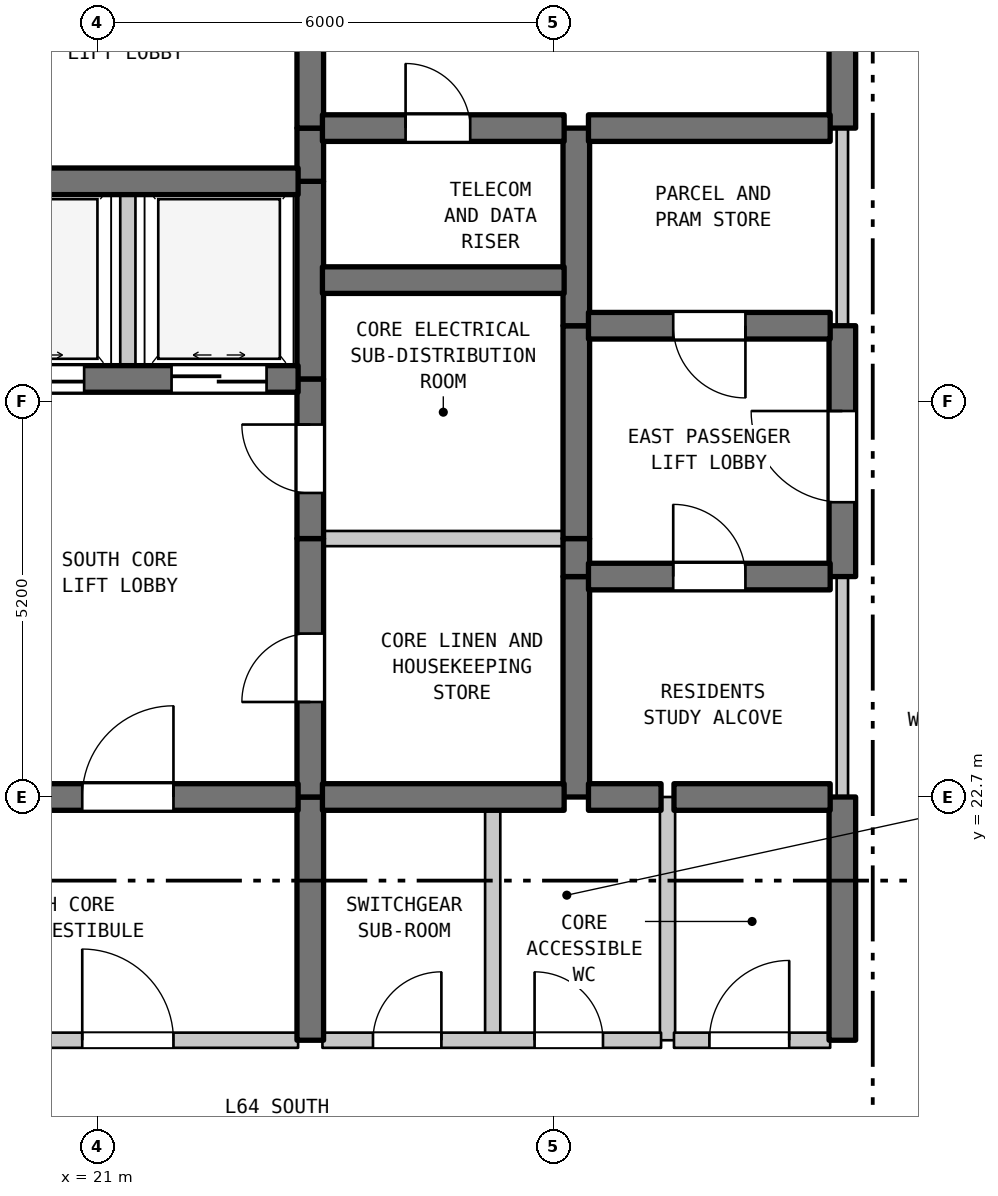
"""IFC4 building model, lengths in metres.
Left out: names, types, materials, properties, quantities, classifications, styles, units other than length and angle.
Written with IfcOpenShell. Run it as: python <this file> out.ifc"""

import sys

from ifc_helpers import new_model, si_unit, direction, frame, frame_2d, origin, place, context, subcontext, project, spatial, rectangle, extrude, element, fill, save


model = new_model("IFC4")
c1 = context("Model", 3, precision=1e-05, world=origin(), true_north=direction((0.0, 1.0)))
c2 = subcontext(c1, "Body", "Model", "MODEL_VIEW")
j1 = project(units=[si_unit("LENGTHUNIT", "METRE"), si_unit("PLANEANGLEUNIT", "RADIAN")], contexts=[c1])
p1 = place(None, origin())
s1 = spatial("IfcSite", under=j1, at=p1, CompositionType="ELEMENT")
p2 = place(p1, origin())
s2 = spatial("IfcBuilding", under=s1, at=p2, CompositionType="ELEMENT")
p3 = place(p2, frame((0.0, 0.0, 258.4)))
s3 = spatial("IfcBuildingStorey", under=s2, at=p3, CompositionType="ELEMENT", Elevation=258.4)
p4 = place(p3, frame((21.4, 28.2, 0.0), z_axis=(0.0, 0.0, 1.0), x_axis=(0.0, 1.0, 0.0)))
e1 = element("IfcWall", 1, at=p4, inside=s3, PredefinedType="STANDARD", context=c2, shape_type="SweptSolid", body=[
    extrude(rectangle(XDim=2.6, YDim=0.2, at=frame_2d((1.3, 0.0))), origin(), (0.0, 0.0, 1.0), 3.39),
])
p5 = place(p3, frame((23.8, 19.5, 0.0), z_axis=(0.0, 0.0, 1.0), x_axis=(0.0, 1.0, 0.0)))
e2 = element("IfcWall", 2, at=p5, inside=s3, PredefinedType="SHEAR", context=c2, shape_type="SweptSolid", body=[
    extrude(rectangle(XDim=3.2, YDim=0.35, at=frame_2d((1.6, 0.0))), origin(), (0.0, 0.0, 1.0), 3.39),
])
p6 = place(p3, frame((23.8, 22.7, 0.0), z_axis=(0.0, 0.0, 1.0), x_axis=(0.0, 1.0, 0.0)))
e3 = element("IfcWall", 3, at=p6, inside=s3, PredefinedType="SHEAR", context=c2, shape_type="SweptSolid", body=[
    extrude(rectangle(XDim=3.4, YDim=0.35, at=frame_2d((1.7, 0.0))), origin(), (0.0, 0.0, 1.0), 3.39),
])
p7 = place(p6, frame((1.25, 0.0, 0.0)))
e4 = element("IfcOpeningElement", 4, at=p7, cuts=e3, PredefinedType="OPENING", context=c2, shape_type="SweptSolid", body=[
    extrude(rectangle(XDim=0.9, YDim=2.15, at=frame_2d((0.45, 1.075))), frame((0.0, 0.185, 0.0), z_axis=(0.0, -1.0, 0.0), x_axis=(1.0, 0.0, 0.0)), (0.0, 0.0, 1.0), 0.37),
])
p8 = place(p3, frame((23.8, 26.1, 0.0), z_axis=(0.0, 0.0, 1.0), x_axis=(0.0, 1.0, 0.0)))
e5 = element("IfcWall", 5, at=p8, inside=s3, PredefinedType="SHEAR", context=c2, shape_type="SweptSolid", body=[
    extrude(rectangle(XDim=2.1, YDim=0.35, at=frame_2d((1.05, 0.0))), origin(), (0.0, 0.0, 1.0), 3.39),
])
p9 = place(p8, frame((0.6, 0.0, 0.0)))
e6 = element("IfcOpeningElement", 6, at=p9, cuts=e5, PredefinedType="OPENING", context=c2, shape_type="SweptSolid", body=[
    extrude(rectangle(XDim=0.9, YDim=2.15, at=frame_2d((0.45, 1.075))), frame((0.0, 0.185, 0.0), z_axis=(0.0, -1.0, 0.0), x_axis=(1.0, 0.0, 0.0)), (0.0, 0.0, 1.0), 0.37),
])
p10 = place(p3, frame((23.8, 28.2, 0.0), z_axis=(0.0, 0.0, 1.0), x_axis=(0.0, 1.0, 0.0)))
e7 = element("IfcWall", 7, at=p10, inside=s3, PredefinedType="SHEAR", context=c2, shape_type="SweptSolid", body=[
    extrude(rectangle(XDim=2.6, YDim=0.35, at=frame_2d((1.3, 0.0))), origin(), (0.0, 0.0, 1.0), 3.39),
])
p11 = place(p3, frame((23.8, 30.8, 0.0), z_axis=(0.0, 0.0, 1.0), x_axis=(0.0, 1.0, 0.0)))
e8 = element("IfcWall", 8, at=p11, inside=s3, PredefinedType="SHEAR", context=c2, shape_type="SweptSolid", body=[
    extrude(rectangle(XDim=0.7, YDim=0.35, at=frame_2d((0.35, 0.0))), origin(), (0.0, 0.0, 1.0), 3.39),
])
p12 = place(p3, frame((23.8, 31.5, 0.0), z_axis=(0.0, 0.0, 1.0), x_axis=(0.0, 1.0, 0.0)))
e9 = element("IfcWall", 9, at=p12, inside=s3, PredefinedType="SHEAR", context=c2, shape_type="SweptSolid", body=[
    extrude(rectangle(XDim=3.5, YDim=0.35, at=frame_2d((1.75, 0.0))), origin(), (0.0, 0.0, 1.0), 3.39),
])
p13 = place(p12, frame((1.127, 0.0, 0.0)))
e10 = element("IfcOpeningElement", 10, at=p13, cuts=e9, PredefinedType="OPENING", context=c2, shape_type="SweptSolid", body=[
    extrude(rectangle(XDim=1.1, YDim=2.15, at=frame_2d((0.55, 1.075))), frame((0.0, 0.185, 0.0), z_axis=(0.0, -1.0, 0.0), x_axis=(1.0, 0.0, 0.0)), (0.0, 0.0, 1.0), 0.37),
])
p14 = place(p3, frame((26.2, 19.5, 0.0), z_axis=(0.0, 0.0, 1.0), x_axis=(0.0, 1.0, 0.0)))
e11 = element("IfcWall", 11, at=p14, inside=s3, PredefinedType="STANDARD", context=c2, shape_type="SweptSolid", body=[
    extrude(rectangle(XDim=3.2, YDim=0.2, at=frame_2d((1.6, 0.0))), origin(), (0.0, 0.0, 1.0), 3.39),
])
p15 = place(p3, frame((27.3, 22.7, 0.0), z_axis=(0.0, 0.0, 1.0), x_axis=(0.0, 1.0, 0.0)))
e12 = element("IfcWall", 12, at=p15, inside=s3, PredefinedType="SHEAR", context=c2, shape_type="SweptSolid", body=[
    extrude(rectangle(XDim=2.9, YDim=0.35, at=frame_2d((1.45, 0.0))), origin(), (0.0, 0.0, 1.0), 3.39),
])
p16 = place(p3, frame((27.3, 25.6, 0.0), z_axis=(0.0, 0.0, 1.0), x_axis=(0.0, 1.0, 0.0)))
e13 = element("IfcWall", 13, at=p16, inside=s3, PredefinedType="SHEAR", context=c2, shape_type="SweptSolid", body=[
    extrude(rectangle(XDim=0.5, YDim=0.35, at=frame_2d((0.25, 0.0))), origin(), (0.0, 0.0, 1.0), 3.39),
])
p17 = place(p3, frame((27.3, 26.1, 0.0), z_axis=(0.0, 0.0, 1.0), x_axis=(0.0, 1.0, 0.0)))
e14 = element("IfcWall", 14, at=p17, inside=s3, PredefinedType="SHEAR", context=c2, shape_type="SweptSolid", body=[
    extrude(rectangle(XDim=2.8, YDim=0.35, at=frame_2d((1.4, 0.0))), origin(), (0.0, 0.0, 1.0), 3.39),
])
p18 = place(p3, frame((27.3, 28.9, 0.0), z_axis=(0.0, 0.0, 1.0), x_axis=(0.0, 1.0, 0.0)))
e15 = element("IfcWall", 15, at=p18, inside=s3, PredefinedType="SHEAR", context=c2, shape_type="SweptSolid", body=[
    extrude(rectangle(XDim=2.6, YDim=0.35, at=frame_2d((1.3, 0.0))), origin(), (0.0, 0.0, 1.0), 3.39),
])
p19 = place(p3, frame((28.5, 19.5, 0.0), z_axis=(0.0, 0.0, 1.0), x_axis=(0.0, 1.0, 0.0)))
e16 = element("IfcWall", 16, at=p19, inside=s3, PredefinedType="STANDARD", context=c2, shape_type="SweptSolid", body=[
    extrude(rectangle(XDim=3.2, YDim=0.2, at=frame_2d((1.6, 0.0))), origin(), (0.0, 0.0, 1.0), 3.39),
])
p20 = place(p3, frame((30.8, 19.5, 0.0), z_axis=(0.0, 0.0, 1.0), x_axis=(0.0, 1.0, 0.0)))
e17 = element("IfcWall", 17, at=p20, inside=s3, PredefinedType="SHEAR", context=c2, shape_type="SweptSolid", body=[
    extrude(rectangle(XDim=3.2, YDim=0.35, at=frame_2d((1.6, 0.0))), origin(), (0.0, 0.0, 1.0), 3.39),
])
p21 = place(p3, frame((30.8, 22.7, 0.0), z_axis=(0.0, 0.0, 1.0), x_axis=(0.0, 1.0, 0.0)))
e18 = element("IfcWall", 18, at=p21, inside=s3, PredefinedType="STANDARD", context=c2, shape_type="SweptSolid", body=[
    extrude(rectangle(XDim=2.9, YDim=0.15, at=frame_2d((1.45, 0.0))), origin(), (0.0, 0.0, 1.0), 3.39),
])
p22 = place(p3, frame((30.8, 25.6, 0.0), z_axis=(0.0, 0.0, 1.0), x_axis=(0.0, 1.0, 0.0)))
e19 = element("IfcWall", 19, at=p22, inside=s3, PredefinedType="SHEAR", context=c2, shape_type="SweptSolid", body=[
    extrude(rectangle(XDim=3.3, YDim=0.35, at=frame_2d((1.65, 0.0))), origin(), (0.0, 0.0, 1.0), 3.39),
])
p23 = place(p22, frame((0.978, 0.0, 0.0)))
e20 = element("IfcOpeningElement", 20, at=p23, cuts=e19, PredefinedType="OPENING", context=c2, shape_type="SweptSolid", body=[
    extrude(rectangle(XDim=1.2, YDim=2.2, at=frame_2d((0.6, 1.1))), frame((0.0, 0.185, 0.0), z_axis=(0.0, -1.0, 0.0), x_axis=(1.0, 0.0, 0.0)), (0.0, 0.0, 1.0), 0.37),
])
p24 = place(p3, frame((30.8, 28.9, 0.0), z_axis=(0.0, 0.0, 1.0), x_axis=(0.0, 1.0, 0.0)))
e21 = element("IfcWall", 21, at=p24, inside=s3, PredefinedType="STANDARD", context=c2, shape_type="SweptSolid", body=[
    extrude(rectangle(XDim=2.6, YDim=0.15, at=frame_2d((1.3, 0.0))), origin(), (0.0, 0.0, 1.0), 3.39),
])
p25 = place(p3, frame((30.8, 31.5, 0.0), z_axis=(0.0, 0.0, 1.0), x_axis=(0.0, 1.0, 0.0)))
e22 = element("IfcWall", 22, at=p25, inside=s3, PredefinedType="SHEAR", context=c2, shape_type="SweptSolid", body=[
    extrude(rectangle(XDim=3.5, YDim=0.35, at=frame_2d((1.75, 0.0))), origin(), (0.0, 0.0, 1.0), 3.39),
])
p26 = place(p25, frame((1.15, 0.0, 0.0)))
e23 = element("IfcOpeningElement", 23, at=p26, cuts=e22, PredefinedType="OPENING", context=c2, shape_type="SweptSolid", body=[
    extrude(rectangle(XDim=1.2, YDim=2.2, at=frame_2d((0.6, 1.1))), frame((0.0, 0.185, 0.0), z_axis=(0.0, -1.0, 0.0), x_axis=(1.0, 0.0, 0.0)), (0.0, 0.0, 1.0), 0.37),
])
p27 = place(p3, frame((19.16, 19.5, 0.0), z_axis=(0.0, 0.0, 1.0), x_axis=(1.0, 0.0, 0.0)))
e24 = element("IfcWall", 24, at=p27, inside=s3, PredefinedType="STANDARD", context=c2, shape_type="SweptSolid", body=[
    extrude(rectangle(XDim=4.48, YDim=0.2, at=frame_2d((2.24, 0.0))), origin(), (0.0, 0.0, 1.0), 3.39),
])
p28 = place(p27, frame((1.64, 0.0, 0.0)))
e25 = element("IfcOpeningElement", 25, at=p28, cuts=e24, PredefinedType="OPENING", context=c2, shape_type="SweptSolid", body=[
    extrude(rectangle(XDim=1.2, YDim=2.2, at=frame_2d((0.6, 1.1))), frame((0.0, 0.11, 0.0), z_axis=(0.0, -1.0, 0.0), x_axis=(1.0, 0.0, 0.0)), (0.0, 0.0, 1.0), 0.22),
])
p29 = place(p3, frame((23.96, 19.5, 0.0), z_axis=(0.0, 0.0, 1.0), x_axis=(1.0, 0.0, 0.0)))
e26 = element("IfcWall", 26, at=p29, inside=s3, PredefinedType="STANDARD", context=c2, shape_type="SweptSolid", body=[
    extrude(rectangle(XDim=4.455, YDim=0.2, at=frame_2d((2.228, 0.0))), origin(), (0.0, 0.0, 1.0), 3.39),
])
p30 = place(p29, frame((0.665, 0.0, 0.0)))
e27 = element("IfcOpeningElement", 27, at=p30, cuts=e26, PredefinedType="OPENING", context=c2, shape_type="SweptSolid", body=[
    extrude(rectangle(XDim=0.9, YDim=2.15, at=frame_2d((0.45, 1.075))), frame((0.0, 0.11, 0.0), z_axis=(0.0, -1.0, 0.0), x_axis=(1.0, 0.0, 0.0)), (0.0, 0.0, 1.0), 0.22),
])
p31 = place(p29, frame((2.791, 0.0, 0.0)))
e28 = element("IfcOpeningElement", 28, at=p31, cuts=e26, PredefinedType="OPENING", context=c2, shape_type="SweptSolid", body=[
    extrude(rectangle(XDim=0.9, YDim=2.15, at=frame_2d((0.45, 1.075))), frame((0.0, 0.11, 0.0), z_axis=(0.0, -1.0, 0.0), x_axis=(1.0, 0.0, 0.0)), (0.0, 0.0, 1.0), 0.22),
])
p32 = place(p3, frame((28.585, 19.5, 0.0), z_axis=(0.0, 0.0, 1.0), x_axis=(1.0, 0.0, 0.0)))
e29 = element("IfcWall", 29, at=p32, inside=s3, PredefinedType="STANDARD", context=c2, shape_type="SweptSolid", body=[
    extrude(rectangle(XDim=2.055, YDim=0.2, at=frame_2d((1.027, 0.0))), origin(), (0.0, 0.0, 1.0), 3.39),
])
p33 = place(p32, frame((0.466, 0.0, 0.0)))
e30 = element("IfcOpeningElement", 30, at=p33, cuts=e29, PredefinedType="OPENING", context=c2, shape_type="SweptSolid", body=[
    extrude(rectangle(XDim=1.05, YDim=2.15, at=frame_2d((0.525, 1.075))), frame((0.0, 0.11, 0.0), z_axis=(0.0, -1.0, 0.0), x_axis=(1.0, 0.0, 0.0)), (0.0, 0.0, 1.0), 0.22),
])
p34 = place(p3, frame((19.16, 22.7, 0.0), z_axis=(0.0, 0.0, 1.0), x_axis=(1.0, 0.0, 0.0)))
e31 = element("IfcWall", 31, at=p34, inside=s3, PredefinedType="SHEAR", context=c2, shape_type="SweptSolid", body=[
    extrude(rectangle(XDim=4.48, YDim=0.35, at=frame_2d((2.24, 0.0))), origin(), (0.0, 0.0, 1.0), 3.39),
])
p35 = place(p34, frame((1.64, 0.0, 0.0)))
e32 = element("IfcOpeningElement", 32, at=p35, cuts=e31, PredefinedType="OPENING", context=c2, shape_type="SweptSolid", body=[
    extrude(rectangle(XDim=1.2, YDim=2.2, at=frame_2d((0.6, 1.1))), frame((0.0, 0.185, 0.0), z_axis=(0.0, -1.0, 0.0), x_axis=(1.0, 0.0, 0.0)), (0.0, 0.0, 1.0), 0.37),
])
p36 = place(p3, frame((23.96, 22.7, 0.0), z_axis=(0.0, 0.0, 1.0), x_axis=(1.0, 0.0, 0.0)))
e33 = element("IfcWall", 33, at=p36, inside=s3, PredefinedType="SHEAR", context=c2, shape_type="SweptSolid", body=[
    extrude(rectangle(XDim=3.18, YDim=0.35, at=frame_2d((1.59, 0.0))), origin(), (0.0, 0.0, 1.0), 3.39),
])
p37 = place(p3, frame((27.46, 22.7, 0.0), z_axis=(0.0, 0.0, 1.0), x_axis=(1.0, 0.0, 0.0)))
e34 = element("IfcWall", 34, at=p37, inside=s3, PredefinedType="SHEAR", context=c2, shape_type="SweptSolid", body=[
    extrude(rectangle(XDim=0.955, YDim=0.35, at=frame_2d((0.478, 0.0))), origin(), (0.0, 0.0, 1.0), 3.39),
])
p38 = place(p3, frame((28.585, 22.7, 0.0), z_axis=(0.0, 0.0, 1.0), x_axis=(1.0, 0.0, 0.0)))
e35 = element("IfcWall", 35, at=p38, inside=s3, PredefinedType="SHEAR", context=c2, shape_type="SweptSolid", body=[
    extrude(rectangle(XDim=2.055, YDim=0.35, at=frame_2d((1.027, 0.0))), origin(), (0.0, 0.0, 1.0), 3.39),
])
p39 = place(p3, frame((27.46, 25.6, 0.0), z_axis=(0.0, 0.0, 1.0), x_axis=(1.0, 0.0, 0.0)))
e36 = element("IfcWall", 36, at=p39, inside=s3, PredefinedType="SHEAR", context=c2, shape_type="SweptSolid", body=[
    extrude(rectangle(XDim=3.18, YDim=0.35, at=frame_2d((1.59, 0.0))), origin(), (0.0, 0.0, 1.0), 3.39),
])
p40 = place(p39, frame((1.115, 0.0, 0.0)))
e37 = element("IfcOpeningElement", 37, at=p40, cuts=e36, PredefinedType="OPENING", context=c2, shape_type="SweptSolid", body=[
    extrude(rectangle(XDim=0.95, YDim=2.15, at=frame_2d((0.475, 1.075))), frame((0.0, 0.185, 0.0), z_axis=(0.0, -1.0, 0.0), x_axis=(1.0, 0.0, 0.0)), (0.0, 0.0, 1.0), 0.37),
])
p41 = place(p3, frame((23.96, 26.1, 0.0), z_axis=(0.0, 0.0, 1.0), x_axis=(1.0, 0.0, 0.0)))
e38 = element("IfcWall", 38, at=p41, inside=s3, PredefinedType="STANDARD", context=c2, shape_type="SweptSolid", body=[
    extrude(rectangle(XDim=3.18, YDim=0.2, at=frame_2d((1.59, 0.0))), origin(), (0.0, 0.0, 1.0), 3.39),
])
p42 = place(p3, frame((19.16, 28.2, 0.0), z_axis=(0.0, 0.0, 1.0), x_axis=(1.0, 0.0, 0.0)))
e39 = element("IfcWall", 39, at=p42, inside=s3, PredefinedType="SHEAR", context=c2, shape_type="SweptSolid", body=[
    extrude(rectangle(XDim=4.48, YDim=0.35, at=frame_2d((2.24, 0.0))), origin(), (0.0, 0.0, 1.0), 3.39),
])
p43 = place(p42, frame((0.415, 0.0, 0.0)))
e40 = element("IfcOpeningElement", 40, at=p43, cuts=e39, PredefinedType="OPENING", context=c2, shape_type="SweptSolid", body=[
    extrude(rectangle(XDim=1.25, YDim=2.2, at=frame_2d((0.625, 1.1))), frame((0.0, 0.185, 0.0), z_axis=(0.0, -1.0, 0.0), x_axis=(1.0, 0.0, 0.0)), (0.0, 0.0, 1.0), 0.37),
])
p44 = place(p42, frame((2.815, 0.0, 0.0)))
e41 = element("IfcOpeningElement", 41, at=p44, cuts=e39, PredefinedType="OPENING", context=c2, shape_type="SweptSolid", body=[
    extrude(rectangle(XDim=1.25, YDim=2.2, at=frame_2d((0.625, 1.1))), frame((0.0, 0.185, 0.0), z_axis=(0.0, -1.0, 0.0), x_axis=(1.0, 0.0, 0.0)), (0.0, 0.0, 1.0), 0.37),
])
p45 = place(p3, frame((27.46, 28.9, 0.0), z_axis=(0.0, 0.0, 1.0), x_axis=(1.0, 0.0, 0.0)))
e42 = element("IfcWall", 42, at=p45, inside=s3, PredefinedType="SHEAR", context=c2, shape_type="SweptSolid", body=[
    extrude(rectangle(XDim=3.18, YDim=0.35, at=frame_2d((1.59, 0.0))), origin(), (0.0, 0.0, 1.0), 3.39),
])
p46 = place(p45, frame((1.115, 0.0, 0.0)))
e43 = element("IfcOpeningElement", 43, at=p46, cuts=e42, PredefinedType="OPENING", context=c2, shape_type="SweptSolid", body=[
    extrude(rectangle(XDim=0.95, YDim=2.15, at=frame_2d((0.475, 1.075))), frame((0.0, 0.185, 0.0), z_axis=(0.0, -1.0, 0.0), x_axis=(1.0, 0.0, 0.0)), (0.0, 0.0, 1.0), 0.37),
])
p47 = place(p3, frame((23.96, 29.5, 0.0), z_axis=(0.0, 0.0, 1.0), x_axis=(1.0, 0.0, 0.0)))
e44 = element("IfcWall", 44, at=p47, inside=s3, PredefinedType="SHEAR", context=c2, shape_type="SweptSolid", body=[
    extrude(rectangle(XDim=3.18, YDim=0.35, at=frame_2d((1.59, 0.0))), origin(), (0.0, 0.0, 1.0), 3.39),
])
p48 = place(p3, frame((19.16, 30.8, 0.0), z_axis=(0.0, 0.0, 1.0), x_axis=(1.0, 0.0, 0.0)))
e45 = element("IfcWall", 45, at=p48, inside=s3, PredefinedType="SHEAR", context=c2, shape_type="SweptSolid", body=[
    extrude(rectangle(XDim=4.48, YDim=0.35, at=frame_2d((2.24, 0.0))), origin(), (0.0, 0.0, 1.0), 3.39),
])
p49 = place(p3, frame((23.96, 31.5, 0.0), z_axis=(0.0, 0.0, 1.0), x_axis=(1.0, 0.0, 0.0)))
e46 = element("IfcWall", 46, at=p49, inside=s3, PredefinedType="SHEAR", context=c2, shape_type="SweptSolid", body=[
    extrude(rectangle(XDim=3.18, YDim=0.35, at=frame_2d((1.59, 0.0))), origin(), (0.0, 0.0, 1.0), 3.39),
])
p50 = place(p49, frame((1.094, 0.0, 0.0)))
e47 = element("IfcOpeningElement", 47, at=p50, cuts=e46, PredefinedType="OPENING", context=c2, shape_type="SweptSolid", body=[
    extrude(rectangle(XDim=0.85, YDim=2.1, at=frame_2d((0.425, 1.05))), frame((0.0, 0.185, 0.0), z_axis=(0.0, -1.0, 0.0), x_axis=(1.0, 0.0, 0.0)), (0.0, 0.0, 1.0), 0.37),
])
p51 = place(p3, frame((27.46, 31.5, 0.0), z_axis=(0.0, 0.0, 1.0), x_axis=(1.0, 0.0, 0.0)))
e48 = element("IfcWall", 48, at=p51, inside=s3, PredefinedType="SHEAR", context=c2, shape_type="SweptSolid", body=[
    extrude(rectangle(XDim=3.18, YDim=0.35, at=frame_2d((1.59, 0.0))), origin(), (0.0, 0.0, 1.0), 3.39),
])
p52 = place(p7, origin())
e49 = element("IfcDoor", 49, at=p52, inside=s3, OperationType="SINGLE_SWING_LEFT", PredefinedType="DOOR", context=c2, shape_type="SweptSolid", body=[
    extrude(rectangle(XDim=0.9, YDim=2.15, at=frame_2d((0.45, 1.075))), frame((0.0, 0.025, 0.0), z_axis=(0.0, -1.0, 0.0), x_axis=(1.0, 0.0, 0.0)), (0.0, 0.0, 1.0), 0.05),
])
fill(e4, e49)
p53 = place(p9, origin())
e50 = element("IfcDoor", 50, at=p53, inside=s3, OperationType="SINGLE_SWING_RIGHT", PredefinedType="DOOR", context=c2, shape_type="SweptSolid", body=[
    extrude(rectangle(XDim=0.9, YDim=2.15, at=frame_2d((0.45, 1.075))), frame((0.0, 0.025, 0.0), z_axis=(0.0, -1.0, 0.0), x_axis=(1.0, 0.0, 0.0)), (0.0, 0.0, 1.0), 0.05),
])
fill(e6, e50)
p54 = place(p23, origin())
e51 = element("IfcDoor", 51, at=p54, inside=s3, OperationType="SINGLE_SWING_RIGHT", PredefinedType="DOOR", context=c2, shape_type="SweptSolid", body=[
    extrude(rectangle(XDim=1.2, YDim=2.2, at=frame_2d((0.6, 1.1))), frame((0.0, 0.025, 0.0), z_axis=(0.0, -1.0, 0.0), x_axis=(1.0, 0.0, 0.0)), (0.0, 0.0, 1.0), 0.05),
])
fill(e20, e51)
p55 = place(p28, origin())
e52 = element("IfcDoor", 52, at=p55, inside=s3, OperationType="SINGLE_SWING_LEFT", PredefinedType="DOOR", context=c2, shape_type="SweptSolid", body=[
    extrude(rectangle(XDim=1.2, YDim=2.2, at=frame_2d((0.6, 1.1))), frame((0.0, 0.025, 0.0), z_axis=(0.0, -1.0, 0.0), x_axis=(1.0, 0.0, 0.0)), (0.0, 0.0, 1.0), 0.05),
])
fill(e25, e52)
p56 = place(p30, origin())
e53 = element("IfcDoor", 53, at=p56, inside=s3, OperationType="SINGLE_SWING_RIGHT", PredefinedType="DOOR", context=c2, shape_type="SweptSolid", body=[
    extrude(rectangle(XDim=0.9, YDim=2.15, at=frame_2d((0.45, 1.075))), frame((0.0, 0.025, 0.0), z_axis=(0.0, -1.0, 0.0), x_axis=(1.0, 0.0, 0.0)), (0.0, 0.0, 1.0), 0.05),
])
fill(e27, e53)
p57 = place(p31, origin())
e54 = element("IfcDoor", 54, at=p57, inside=s3, OperationType="SINGLE_SWING_LEFT", PredefinedType="DOOR", context=c2, shape_type="SweptSolid", body=[
    extrude(rectangle(XDim=0.9, YDim=2.15, at=frame_2d((0.45, 1.075))), frame((0.0, 0.025, 0.0), z_axis=(0.0, -1.0, 0.0), x_axis=(1.0, 0.0, 0.0)), (0.0, 0.0, 1.0), 0.05),
])
fill(e28, e54)
p58 = place(p33, origin())
e55 = element("IfcDoor", 55, at=p58, inside=s3, OperationType="SINGLE_SWING_RIGHT", PredefinedType="DOOR", context=c2, shape_type="SweptSolid", body=[
    extrude(rectangle(XDim=1.05, YDim=2.15, at=frame_2d((0.525, 1.075))), frame((0.0, 0.025, 0.0), z_axis=(0.0, -1.0, 0.0), x_axis=(1.0, 0.0, 0.0)), (0.0, 0.0, 1.0), 0.05),
])
fill(e30, e55)
p59 = place(p35, origin())
e56 = element("IfcDoor", 56, at=p59, inside=s3, OperationType="SINGLE_SWING_RIGHT", PredefinedType="DOOR", context=c2, shape_type="SweptSolid", body=[
    extrude(rectangle(XDim=1.2, YDim=2.2, at=frame_2d((0.6, 1.1))), frame((0.0, 0.025, 0.0), z_axis=(0.0, -1.0, 0.0), x_axis=(1.0, 0.0, 0.0)), (0.0, 0.0, 1.0), 0.05),
])
fill(e32, e56)
p60 = place(p40, origin())
e57 = element("IfcDoor", 57, at=p60, inside=s3, OperationType="SINGLE_SWING_LEFT", PredefinedType="DOOR", context=c2, shape_type="SweptSolid", body=[
    extrude(rectangle(XDim=0.95, YDim=2.15, at=frame_2d((0.475, 1.075))), frame((0.0, 0.025, 0.0), z_axis=(0.0, -1.0, 0.0), x_axis=(1.0, 0.0, 0.0)), (0.0, 0.0, 1.0), 0.05),
])
fill(e37, e57)
p61 = place(p43, origin())
e58 = element("IfcDoor", 58, at=p61, inside=s3, OperationType="DOUBLE_DOOR_SLIDING", PredefinedType="DOOR", context=c2, shape_type="SweptSolid", body=[
    extrude(rectangle(XDim=1.25, YDim=2.2, at=frame_2d((0.625, 1.1))), frame((0.0, 0.025, 0.0), z_axis=(0.0, -1.0, 0.0), x_axis=(1.0, 0.0, 0.0)), (0.0, 0.0, 1.0), 0.05),
])
fill(e40, e58)
p62 = place(p44, origin())
e59 = element("IfcDoor", 59, at=p62, inside=s3, OperationType="DOUBLE_DOOR_SLIDING", PredefinedType="DOOR", context=c2, shape_type="SweptSolid", body=[
    extrude(rectangle(XDim=1.25, YDim=2.2, at=frame_2d((0.625, 1.1))), frame((0.0, 0.025, 0.0), z_axis=(0.0, -1.0, 0.0), x_axis=(1.0, 0.0, 0.0)), (0.0, 0.0, 1.0), 0.05),
])
fill(e41, e59)
p63 = place(p46, frame((0.95, 0.0, 0.0), z_axis=(0.0, 0.0, 1.0), x_axis=(-1.0, 0.0, 0.0)))
e60 = element("IfcDoor", 60, at=p63, inside=s3, OperationType="SINGLE_SWING_RIGHT", PredefinedType="DOOR", context=c2, shape_type="SweptSolid", body=[
    extrude(rectangle(XDim=0.95, YDim=2.15, at=frame_2d((0.475, 1.075))), frame((0.0, 0.025, 0.0), z_axis=(0.0, -1.0, 0.0), x_axis=(1.0, 0.0, 0.0)), (0.0, 0.0, 1.0), 0.05),
])
fill(e43, e60)
p64 = place(p50, origin())
e61 = element("IfcDoor", 61, at=p64, inside=s3, OperationType="SINGLE_SWING_LEFT", PredefinedType="DOOR", context=c2, shape_type="SweptSolid", body=[
    extrude(rectangle(XDim=0.85, YDim=2.1, at=frame_2d((0.425, 1.05))), frame((0.0, 0.025, 0.0), z_axis=(0.0, -1.0, 0.0), x_axis=(1.0, 0.0, 0.0)), (0.0, 0.0, 1.0), 0.05),
])
fill(e47, e61)
save(model, sys.argv[1])
